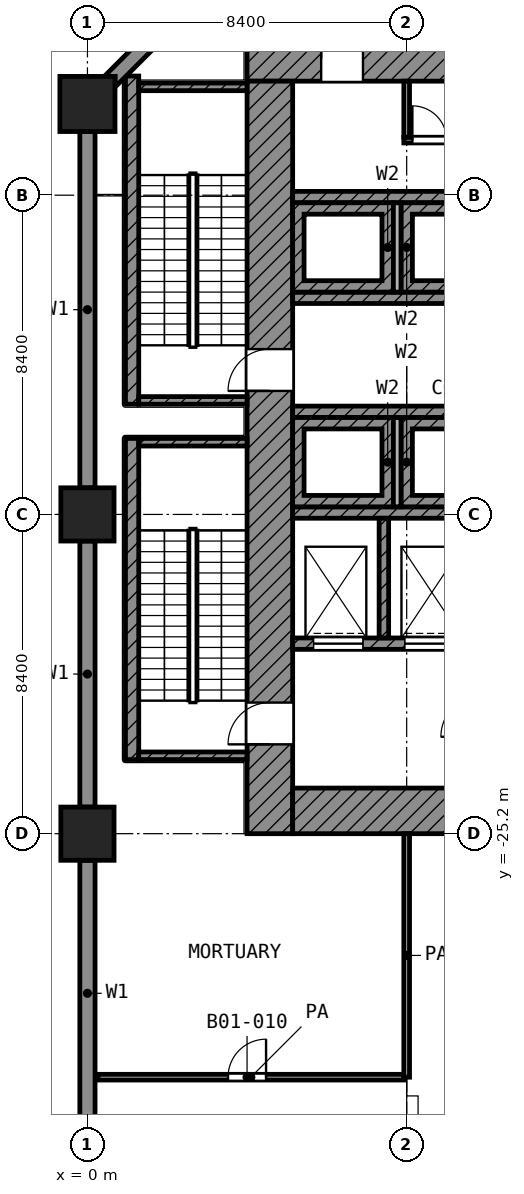
"""IFC4 building model, lengths in metres.
Left out: names, types, materials, properties, quantities, classifications, styles, units other than length and angle.
Written with IfcOpenShell. Run it as: python <this file> out.ifc"""

import sys

from ifc_helpers import new_model, si_unit, direction, frame, frame_2d, origin, origin_2d, place, context, subcontext, project, spatial, polyline, rectangle, outline, extrude, element, fill, save


model = new_model("IFC4")
c1 = context("Model", 3, precision=1e-05, world=origin(), true_north=direction((0.0, 1.0)))
c2 = subcontext(c1, "Body", "Model", "MODEL_VIEW")
j1 = project(units=[si_unit("LENGTHUNIT", "METRE"), si_unit("PLANEANGLEUNIT", "RADIAN")], contexts=[c1])
p1 = place(None, origin())
s1 = spatial("IfcSite", under=j1, at=p1, CompositionType="ELEMENT")
p2 = place(p1, origin())
s2 = spatial("IfcBuilding", under=s1, at=p2, CompositionType="ELEMENT")
p3 = place(p2, frame((0.0, 0.0, -6.0)))
s3 = spatial("IfcBuildingStorey", under=s2, at=p3, CompositionType="ELEMENT", Elevation=-6.0)
p4 = place(p3, origin())
e1 = element("IfcWall", 1, at=p4, inside=s3, PredefinedType="SOLIDWALL", context=c2, shape_type="SweptSolid", body=[
    extrude(outline(polyline([(5.275, -0.725), (5.558, -0.725), (0.725, -5.558), (0.725, -5.275), (0.442, -5.275), (5.275, -0.442), (5.275, -0.725)])), origin(), (0.0, 0.0, 1.0), 5.55),
])
e2 = element("IfcWall", 2, at=p4, inside=s3, PredefinedType="SOLIDWALL", context=c2, shape_type="SweptSolid", body=[
    extrude(outline(polyline([(0.2, -6.725), (0.2, -16.1), (-0.2, -16.1), (-0.2, -6.725), (0.2, -6.725)])), origin(), (0.0, 0.0, 1.0), 5.55),
])
e3 = element("IfcWall", 3, at=p4, inside=s3, PredefinedType="SOLIDWALL", context=c2, shape_type="SweptSolid", body=[
    extrude(outline(polyline([(0.2, -17.5), (0.2, -24.5), (-0.2, -24.5), (-0.2, -17.5), (0.2, -17.5)])), origin(), (0.0, 0.0, 1.0), 5.55),
])
e4 = element("IfcWall", 4, at=p4, inside=s3, PredefinedType="SOLIDWALL", context=c2, shape_type="SweptSolid", body=[
    extrude(outline(polyline([(0.2, -25.9), (0.2, -32.9), (-0.2, -32.9), (-0.2, -25.9), (0.2, -25.9)])), origin(), (0.0, 0.0, 1.0), 5.55),
])
e5 = element("IfcWall", 5, at=p4, inside=s3, PredefinedType="SHEAR", context=c2, shape_type="SweptSolid", body=[
    extrude(outline(polyline([(5.4, -10.95), (5.4, -8.6), (8.05, -8.6), (8.05, -10.95), (5.4, -10.95)]), holes=[polyline([(7.75, -8.9), (5.7, -8.9), (5.7, -10.65), (7.75, -10.65), (7.75, -8.9)])]), origin(), (0.0, 0.0, 1.0), 4.2),
])
e6 = element("IfcWall", 6, at=p4, inside=s3, PredefinedType="SHEAR", context=c2, shape_type="SweptSolid", body=[
    extrude(outline(polyline([(8.25, -10.95), (8.25, -8.6), (10.8, -8.6), (10.8, -10.95), (8.25, -10.95)]), holes=[polyline([(10.5, -8.9), (8.55, -8.9), (8.55, -10.65), (10.5, -10.65), (10.5, -8.9)])]), origin(), (0.0, 0.0, 1.0), 4.2),
])
e7 = element("IfcWall", 7, at=p4, inside=s3, PredefinedType="SHEAR", context=c2, shape_type="SweptSolid", body=[
    extrude(outline(polyline([(5.4, -16.6), (5.4, -14.25), (8.05, -14.25), (8.05, -16.6), (5.4, -16.6)]), holes=[polyline([(7.75, -14.55), (5.7, -14.55), (5.7, -16.3), (7.75, -16.3), (7.75, -14.55)])]), origin(), (0.0, 0.0, 1.0), 4.2),
])
e8 = element("IfcWall", 8, at=p4, inside=s3, PredefinedType="SHEAR", context=c2, shape_type="SweptSolid", body=[
    extrude(outline(polyline([(8.25, -16.6), (8.25, -14.25), (10.8, -14.25), (10.8, -16.6), (8.25, -16.6)]), holes=[polyline([(10.5, -14.55), (8.55, -14.55), (8.55, -16.3), (10.5, -16.3), (10.5, -14.55)])]), origin(), (0.0, 0.0, 1.0), 4.2),
])
p5 = place(p3, frame((0.0, -6.0, 0.0), z_axis=(0.0, 0.0, 1.0), x_axis=(1.0, 0.0, 0.0)))
e9 = element("IfcColumn", 9, at=p5, inside=s3, PredefinedType="COLUMN", context=c2, shape_type="SweptSolid", body=[
    extrude(rectangle(XDim=1.45, YDim=1.45, at=origin_2d()), origin(), (0.0, 0.0, 1.0), 6.0),
])
for number, where, z_axis, x_axis in (
    (10, (0.0, -16.8, 0.0), (0.0, 0.0, 1.0), (1.0, 0.0, 0.0)),
    (11, (0.0, -25.2, 0.0), (0.0, 0.0, 1.0), (1.0, 0.0, 0.0)),
):
    element("IfcColumn", number, at=place(p3, frame(where, z_axis=z_axis, x_axis=x_axis)), inside=s3, PredefinedType="COLUMN", context=c2, shape_type="SweptSolid", body=[
        extrude(rectangle(XDim=1.4, YDim=1.4, at=origin_2d()), origin(), (0.0, 0.0, 1.0), 6.0),
    ])
p6 = place(p3, frame((4.2, -4.8, 0.0), z_axis=(0.0, 0.0, 1.0), x_axis=(1.0, 0.0, 0.0)))
e12 = element("IfcWall", 12, at=p6, inside=s3, PredefinedType="SHEAR", context=c2, shape_type="SweptSolid", body=[
    extrude(rectangle(XDim=21.0, YDim=1.2, at=frame_2d((10.5, 0.0))), origin(), (0.0, 0.0, 1.0), 5.55),
])
p7 = place(p6, frame((1.95, 0.0, 0.0)))
e13 = element("IfcOpeningElement", 13, at=p7, cuts=e12, PredefinedType="OPENING", context=c2, shape_type="SweptSolid", body=[
    extrude(rectangle(XDim=1.1, YDim=2.1, at=frame_2d((0.55, 1.05))), frame((0.0, 0.61, 0.0), z_axis=(0.0, -1.0, 0.0), x_axis=(1.0, 0.0, 0.0)), (0.0, 0.0, 1.0), 1.22),
])
p8 = place(p6, frame((17.95, 0.0, 0.0)))
e14 = element("IfcOpeningElement", 14, at=p8, cuts=e12, PredefinedType="OPENING", context=c2, shape_type="SweptSolid", body=[
    extrude(rectangle(XDim=1.1, YDim=2.1, at=frame_2d((0.55, 1.05))), frame((0.0, 0.61, 0.0), z_axis=(0.0, -1.0, 0.0), x_axis=(1.0, 0.0, 0.0)), (0.0, 0.0, 1.0), 1.22),
])
p9 = place(p3, frame((4.8, -25.2, 0.0), z_axis=(0.0, 0.0, 1.0), x_axis=(0.0, 1.0, 0.0)))
e15 = element("IfcWall", 15, at=p9, inside=s3, PredefinedType="SHEAR", context=c2, shape_type="SweptSolid", body=[
    extrude(rectangle(XDim=19.8, YDim=1.2, at=frame_2d((9.9, 0.0))), origin(), (0.0, 0.0, 1.0), 5.55),
])
p10 = place(p9, frame((11.65, 0.0, 0.0)))
e16 = element("IfcOpeningElement", 16, at=p10, cuts=e15, PredefinedType="OPENING", context=c2, shape_type="SweptSolid", body=[
    extrude(rectangle(XDim=1.1, YDim=2.1, at=frame_2d((0.55, 1.05))), frame((0.0, 0.61, 0.0), z_axis=(0.0, -1.0, 0.0), x_axis=(1.0, 0.0, 0.0)), (0.0, 0.0, 1.0), 1.22),
])
p11 = place(p9, frame((2.35, 0.0, 0.0)))
e17 = element("IfcOpeningElement", 17, at=p11, cuts=e15, PredefinedType="OPENING", context=c2, shape_type="SweptSolid", body=[
    extrude(rectangle(XDim=1.1, YDim=2.1, at=frame_2d((0.55, 1.05))), frame((0.0, 0.61, 0.0), z_axis=(0.0, -1.0, 0.0), x_axis=(1.0, 0.0, 0.0)), (0.0, 0.0, 1.0), 1.22),
])
p12 = place(p3, frame((5.4, -24.6, 0.0), z_axis=(0.0, 0.0, 1.0), x_axis=(1.0, 0.0, 0.0)))
e18 = element("IfcWall", 18, at=p12, inside=s3, PredefinedType="SHEAR", context=c2, shape_type="SweptSolid", body=[
    extrude(rectangle(XDim=18.6, YDim=1.2, at=frame_2d((9.3, 0.0))), origin(), (0.0, 0.0, 1.0), 5.55),
])
p13 = place(p12, frame((6.3, 0.0, 0.0)))
e19 = element("IfcOpeningElement", 19, at=p13, cuts=e18, PredefinedType="OPENING", context=c2, shape_type="SweptSolid", body=[
    extrude(rectangle(XDim=1.8, YDim=2.1, at=frame_2d((0.9, 1.05))), frame((0.0, 0.61, 0.0), z_axis=(0.0, -1.0, 0.0), x_axis=(1.0, 0.0, 0.0)), (0.0, 0.0, 1.0), 1.22),
])
for number, where, z_axis, x_axis in (
    (20, (5.4, -8.45, 0.0), (0.0, 0.0, 1.0), (1.0, 0.0, 0.0)),
    (21, (5.4, -11.1, 0.0), (0.0, 0.0, 1.0), (1.0, 0.0, 0.0)),
    (22, (5.4, -14.1, 0.0), (0.0, 0.0, 1.0), (1.0, 0.0, 0.0)),
    (23, (5.4, -16.75, 0.0), (0.0, 0.0, 1.0), (1.0, 0.0, 0.0)),
):
    element("IfcWall", number, at=place(p3, frame(where, z_axis=z_axis, x_axis=x_axis)), inside=s3, PredefinedType="SHEAR", context=c2, shape_type="SweptSolid", body=[
        extrude(rectangle(XDim=16.65, YDim=0.3, at=frame_2d((8.325, 0.0))), origin(), (0.0, 0.0, 1.0), 5.55),
    ])
p14 = place(p3, frame((5.4, -20.2, 0.0), z_axis=(0.0, 0.0, 1.0), x_axis=(1.0, 0.0, 0.0)))
e24 = element("IfcWall", 24, at=p14, inside=s3, PredefinedType="SHEAR", context=c2, shape_type="SweptSolid", body=[
    extrude(rectangle(XDim=14.65, YDim=0.3, at=frame_2d((7.325, 0.0))), origin(), (0.0, 0.0, 1.0), 5.55),
])
p15 = place(p14, frame((10.55, 0.0, 0.0)))
e25 = element("IfcOpeningElement", 25, at=p15, cuts=e24, PredefinedType="OPENING", context=c2, shape_type="SweptSolid", body=[
    extrude(rectangle(XDim=1.3, YDim=2.1, at=frame_2d((0.65, 1.05))), frame((0.0, 0.16, 0.0), z_axis=(0.0, -1.0, 0.0), x_axis=(1.0, 0.0, 0.0)), (0.0, 0.0, 1.0), 0.32),
])
p16 = place(p14, frame((12.95, 0.0, 0.0)))
e26 = element("IfcOpeningElement", 26, at=p16, cuts=e24, PredefinedType="OPENING", context=c2, shape_type="SweptSolid", body=[
    extrude(rectangle(XDim=1.3, YDim=2.1, at=frame_2d((0.65, 1.05))), frame((0.0, 0.16, 0.0), z_axis=(0.0, -1.0, 0.0), x_axis=(1.0, 0.0, 0.0)), (0.0, 0.0, 1.0), 0.32),
])
p17 = place(p14, frame((0.55, 0.0, 0.0)))
e27 = element("IfcOpeningElement", 27, at=p17, cuts=e24, PredefinedType="OPENING", context=c2, shape_type="SweptSolid", body=[
    extrude(rectangle(XDim=1.3, YDim=2.1, at=frame_2d((0.65, 1.05))), frame((0.0, 0.16, 0.0), z_axis=(0.0, -1.0, 0.0), x_axis=(1.0, 0.0, 0.0)), (0.0, 0.0, 1.0), 0.32),
])
p18 = place(p14, frame((2.95, 0.0, 0.0)))
e28 = element("IfcOpeningElement", 28, at=p18, cuts=e24, PredefinedType="OPENING", context=c2, shape_type="SweptSolid", body=[
    extrude(rectangle(XDim=1.3, YDim=2.1, at=frame_2d((0.65, 1.05))), frame((0.0, 0.16, 0.0), z_axis=(0.0, -1.0, 0.0), x_axis=(1.0, 0.0, 0.0)), (0.0, 0.0, 1.0), 0.32),
])
p19 = place(p14, frame((5.95, 0.0, 0.0)))
e29 = element("IfcOpeningElement", 29, at=p19, cuts=e24, PredefinedType="OPENING", context=c2, shape_type="SweptSolid", body=[
    extrude(rectangle(XDim=0.9, YDim=2.1, at=frame_2d((0.45, 1.05))), frame((0.0, 0.16, 0.0), z_axis=(0.0, -1.0, 0.0), x_axis=(1.0, 0.0, 0.0)), (0.0, 0.0, 1.0), 0.32),
])
p20 = place(p14, frame((8.35, 0.0, 0.0)))
e30 = element("IfcOpeningElement", 30, at=p20, cuts=e24, PredefinedType="OPENING", context=c2, shape_type="SweptSolid", body=[
    extrude(rectangle(XDim=0.9, YDim=2.1, at=frame_2d((0.45, 1.05))), frame((0.0, 0.16, 0.0), z_axis=(0.0, -1.0, 0.0), x_axis=(1.0, 0.0, 0.0)), (0.0, 0.0, 1.0), 0.32),
])
p21 = place(p3, frame((7.8, -20.05, 0.0), z_axis=(0.0, 0.0, 1.0), x_axis=(0.0, 1.0, 0.0)))
e31 = element("IfcWall", 31, at=p21, inside=s3, PredefinedType="SHEAR", context=c2, shape_type="SweptSolid", body=[
    extrude(rectangle(XDim=3.15, YDim=0.25, at=frame_2d((1.575, 0.0))), origin(), (0.0, 0.0, 1.0), 5.55),
])
p22 = place(p3, frame((8.15, -10.95, 0.0), z_axis=(0.0, 0.0, 1.0), x_axis=(0.0, 1.0, 0.0)))
e32 = element("IfcWall", 32, at=p22, inside=s3, PredefinedType="PARTITIONING", context=c2, shape_type="SweptSolid", body=[
    extrude(rectangle(XDim=2.35, YDim=0.2, at=frame_2d((1.175, 0.0))), origin(), (0.0, 0.0, 1.0), 5.55),
])
p23 = place(p3, frame((8.15, -16.6, 0.0), z_axis=(0.0, 0.0, 1.0), x_axis=(0.0, 1.0, 0.0)))
e33 = element("IfcWall", 33, at=p23, inside=s3, PredefinedType="PARTITIONING", context=c2, shape_type="SweptSolid", body=[
    extrude(rectangle(XDim=2.35, YDim=0.2, at=frame_2d((1.175, 0.0))), origin(), (0.0, 0.0, 1.0), 5.55),
])
p24 = place(p3, frame((8.325, -6.95, 0.0), z_axis=(0.0, 0.0, 1.0), x_axis=(1.0, 0.0, 0.0)))
e34 = element("IfcWall", 34, at=p24, inside=s3, PredefinedType="PARTITIONING", context=c2, shape_type="SweptSolid", body=[
    extrude(rectangle(XDim=12.75, YDim=0.15, at=frame_2d((6.375, 0.0))), origin(), (0.0, 0.0, 1.0), 5.55),
])
p25 = place(p24, frame((0.225, 0.0, 0.0)))
e35 = element("IfcOpeningElement", 35, at=p25, cuts=e34, PredefinedType="OPENING", context=c2, shape_type="SweptSolid", body=[
    extrude(rectangle(XDim=0.9, YDim=2.1, at=frame_2d((0.45, 1.05))), frame((0.0, 0.085, 0.0), z_axis=(0.0, -1.0, 0.0), x_axis=(1.0, 0.0, 0.0)), (0.0, 0.0, 1.0), 0.17),
])
p26 = place(p24, frame((2.025, 0.0, 0.0)))
e36 = element("IfcOpeningElement", 36, at=p26, cuts=e34, PredefinedType="OPENING", context=c2, shape_type="SweptSolid", body=[
    extrude(rectangle(XDim=0.9, YDim=2.1, at=frame_2d((0.45, 1.05))), frame((0.0, 0.085, 0.0), z_axis=(0.0, -1.0, 0.0), x_axis=(1.0, 0.0, 0.0)), (0.0, 0.0, 1.0), 0.17),
])
p27 = place(p24, frame((4.125, 0.0, 0.0)))
e37 = element("IfcOpeningElement", 37, at=p27, cuts=e34, PredefinedType="OPENING", context=c2, shape_type="SweptSolid", body=[
    extrude(rectangle(XDim=0.9, YDim=2.1, at=frame_2d((0.45, 1.05))), frame((0.0, 0.085, 0.0), z_axis=(0.0, -1.0, 0.0), x_axis=(1.0, 0.0, 0.0)), (0.0, 0.0, 1.0), 0.17),
])
p28 = place(p24, frame((5.625, 0.0, 0.0)))
e38 = element("IfcOpeningElement", 38, at=p28, cuts=e34, PredefinedType="OPENING", context=c2, shape_type="SweptSolid", body=[
    extrude(rectangle(XDim=0.9, YDim=2.1, at=frame_2d((0.45, 1.05))), frame((0.0, 0.085, 0.0), z_axis=(0.0, -1.0, 0.0), x_axis=(1.0, 0.0, 0.0)), (0.0, 0.0, 1.0), 0.17),
])
p29 = place(p24, frame((7.425, 0.0, 0.0)))
e39 = element("IfcOpeningElement", 39, at=p29, cuts=e34, PredefinedType="OPENING", context=c2, shape_type="SweptSolid", body=[
    extrude(rectangle(XDim=0.9, YDim=2.1, at=frame_2d((0.45, 1.05))), frame((0.0, 0.085, 0.0), z_axis=(0.0, -1.0, 0.0), x_axis=(1.0, 0.0, 0.0)), (0.0, 0.0, 1.0), 0.17),
])
p30 = place(p24, frame((9.225, 0.0, 0.0)))
e40 = element("IfcOpeningElement", 40, at=p30, cuts=e34, PredefinedType="OPENING", context=c2, shape_type="SweptSolid", body=[
    extrude(rectangle(XDim=0.9, YDim=2.1, at=frame_2d((0.45, 1.05))), frame((0.0, 0.085, 0.0), z_axis=(0.0, -1.0, 0.0), x_axis=(1.0, 0.0, 0.0)), (0.0, 0.0, 1.0), 0.17),
])
p31 = place(p24, frame((11.025, 0.0, 0.0)))
e41 = element("IfcOpeningElement", 41, at=p31, cuts=e34, PredefinedType="OPENING", context=c2, shape_type="SweptSolid", body=[
    extrude(rectangle(XDim=0.9, YDim=2.1, at=frame_2d((0.45, 1.05))), frame((0.0, 0.085, 0.0), z_axis=(0.0, -1.0, 0.0), x_axis=(1.0, 0.0, 0.0)), (0.0, 0.0, 1.0), 0.17),
])
p32 = place(p3, frame((8.4, -6.875, 0.0), z_axis=(0.0, 0.0, 1.0), x_axis=(0.0, 1.0, 0.0)))
e42 = element("IfcWall", 42, at=p32, inside=s3, PredefinedType="PARTITIONING", context=c2, shape_type="SweptSolid", body=[
    extrude(rectangle(XDim=1.475, YDim=0.15, at=frame_2d((0.738, 0.0))), origin(), (0.0, 0.0, 1.0), 5.55),
])
p33 = place(p3, frame((1.175, -13.9, 0.0), z_axis=(0.0, 0.0, 1.0), x_axis=(0.0, 1.0, 0.0)))
e43 = element("IfcWall", 43, at=p33, inside=s3, PredefinedType="SHEAR", context=c2, shape_type="SweptSolid", body=[
    extrude(rectangle(XDim=8.635, YDim=0.35, at=frame_2d((4.317, 0.0))), origin(), (0.0, 0.0, 1.0), 5.55),
])
for number, where, z_axis, x_axis in (
    (44, (1.35, -5.55, 0.0), (0.0, 0.0, 1.0), (1.0, 0.0, 0.0)),
    (45, (1.35, -13.8, 0.0), (0.0, 0.0, 1.0), (1.0, 0.0, 0.0)),
):
    element("IfcWall", number, at=place(p3, frame(where, z_axis=z_axis, x_axis=x_axis)), inside=s3, PredefinedType="SHEAR", context=c2, shape_type="SweptSolid", body=[
        extrude(rectangle(XDim=2.85, YDim=0.2, at=frame_2d((1.425, 0.0))), origin(), (0.0, 0.0, 1.0), 5.55),
    ])
p34 = place(p3, frame((1.175, -23.25, 0.0), z_axis=(0.0, 0.0, 1.0), x_axis=(0.0, 1.0, 0.0)))
e46 = element("IfcWall", 46, at=p34, inside=s3, PredefinedType="SHEAR", context=c2, shape_type="SweptSolid", body=[
    extrude(rectangle(XDim=8.45, YDim=0.35, at=frame_2d((4.225, 0.0))), origin(), (0.0, 0.0, 1.0), 5.55),
])
for number, where, z_axis, x_axis in (
    (47, (1.35, -14.9, 0.0), (0.0, 0.0, 1.0), (1.0, 0.0, 0.0)),
    (48, (1.35, -23.15, 0.0), (0.0, 0.0, 1.0), (1.0, 0.0, 0.0)),
):
    element("IfcWall", number, at=place(p3, frame(where, z_axis=z_axis, x_axis=x_axis)), inside=s3, PredefinedType="SHEAR", context=c2, shape_type="SweptSolid", body=[
        extrude(rectangle(XDim=2.85, YDim=0.2, at=frame_2d((1.425, 0.0))), origin(), (0.0, 0.0, 1.0), 5.55),
    ])
p35 = place(p3, frame((0.274, -31.607, 0.0), z_axis=(0.0, 0.0, 1.0), x_axis=(1.0, 0.0, 0.0)))
e49 = element("IfcWall", 49, at=p35, inside=s3, PredefinedType="PARTITIONING", context=c2, shape_type="SweptSolid", body=[
    extrude(rectangle(XDim=8.051, YDim=0.15, at=frame_2d((4.025, 0.0))), origin(), (0.0, 0.0, 1.0), 5.55),
])
p36 = place(p35, frame((3.426, 0.0, 0.0)))
e50 = element("IfcOpeningElement", 50, at=p36, cuts=e49, PredefinedType="OPENING", context=c2, shape_type="SweptSolid", body=[
    extrude(rectangle(XDim=1.0, YDim=2.1, at=frame_2d((0.5, 1.05))), frame((0.0, 0.085, 0.0), z_axis=(0.0, -1.0, 0.0), x_axis=(1.0, 0.0, 0.0)), (0.0, 0.0, 1.0), 0.17),
])
p37 = place(p3, frame((8.4, -31.607, 0.0), z_axis=(0.0, 0.0, 1.0), x_axis=(0.0, 1.0, 0.0)))
e51 = element("IfcWall", 51, at=p37, inside=s3, PredefinedType="PARTITIONING", context=c2, shape_type="SweptSolid", body=[
    extrude(rectangle(XDim=6.407, YDim=0.15, at=frame_2d((3.204, 0.0))), origin(), (0.0, 0.0, 1.0), 5.55),
])
p38 = place(p17, origin())
e52 = element("IfcDoor", 52, at=p38, inside=s3, OperationType="DOUBLE_DOOR_SLIDING", PredefinedType="DOOR", context=c2, shape_type="SweptSolid", body=[
    extrude(rectangle(XDim=1.3, YDim=2.1, at=frame_2d((0.65, 1.05))), frame((0.0, 0.025, 0.0), z_axis=(0.0, -1.0, 0.0), x_axis=(1.0, 0.0, 0.0)), (0.0, 0.0, 1.0), 0.05),
])
fill(e27, e52)
p39 = place(p18, origin())
e53 = element("IfcDoor", 53, at=p39, inside=s3, OperationType="DOUBLE_DOOR_SLIDING", PredefinedType="DOOR", context=c2, shape_type="SweptSolid", body=[
    extrude(rectangle(XDim=1.3, YDim=2.1, at=frame_2d((0.65, 1.05))), frame((0.0, 0.025, 0.0), z_axis=(0.0, -1.0, 0.0), x_axis=(1.0, 0.0, 0.0)), (0.0, 0.0, 1.0), 0.05),
])
fill(e28, e53)
p40 = place(p10, origin())
e54 = element("IfcDoor", 54, at=p40, inside=s3, OperationType="SINGLE_SWING_LEFT", PredefinedType="DOOR", context=c2, shape_type="SweptSolid", body=[
    extrude(rectangle(XDim=1.1, YDim=2.1, at=frame_2d((0.55, 1.05))), frame((0.0, 0.025, 0.0), z_axis=(0.0, -1.0, 0.0), x_axis=(1.0, 0.0, 0.0)), (0.0, 0.0, 1.0), 0.05),
])
fill(e16, e54)
p41 = place(p11, origin())
e55 = element("IfcDoor", 55, at=p41, inside=s3, OperationType="SINGLE_SWING_LEFT", PredefinedType="DOOR", context=c2, shape_type="SweptSolid", body=[
    extrude(rectangle(XDim=1.1, YDim=2.1, at=frame_2d((0.55, 1.05))), frame((0.0, 0.025, 0.0), z_axis=(0.0, -1.0, 0.0), x_axis=(1.0, 0.0, 0.0)), (0.0, 0.0, 1.0), 0.05),
])
fill(e17, e55)
p42 = place(p7, origin())
e56 = element("IfcDoor", 56, at=p42, inside=s3, OperationType="SINGLE_SWING_LEFT", PredefinedType="DOOR", context=c2, shape_type="SweptSolid", body=[
    extrude(rectangle(XDim=1.1, YDim=2.1, at=frame_2d((0.55, 1.05))), frame((0.0, 0.025, 0.0), z_axis=(0.0, -1.0, 0.0), x_axis=(1.0, 0.0, 0.0)), (0.0, 0.0, 1.0), 0.05),
])
fill(e13, e56)
p43 = place(p25, origin())
e57 = element("IfcDoor", 57, at=p43, inside=s3, OperationType="SINGLE_SWING_LEFT", PredefinedType="DOOR", context=c2, shape_type="SweptSolid", body=[
    extrude(rectangle(XDim=0.9, YDim=2.1, at=frame_2d((0.45, 1.05))), frame((0.0, 0.025, 0.0), z_axis=(0.0, -1.0, 0.0), x_axis=(1.0, 0.0, 0.0)), (0.0, 0.0, 1.0), 0.05),
])
fill(e35, e57)
p44 = place(p36, origin())
e58 = element("IfcDoor", 58, at=p44, inside=s3, OperationType="SINGLE_SWING_RIGHT", PredefinedType="DOOR", context=c2, shape_type="SweptSolid", body=[
    extrude(rectangle(XDim=1.0, YDim=2.1, at=frame_2d((0.5, 1.05))), frame((0.0, 0.025, 0.0), z_axis=(0.0, -1.0, 0.0), x_axis=(1.0, 0.0, 0.0)), (0.0, 0.0, 1.0), 0.05),
])
fill(e50, e58)
save(model, sys.argv[1])
